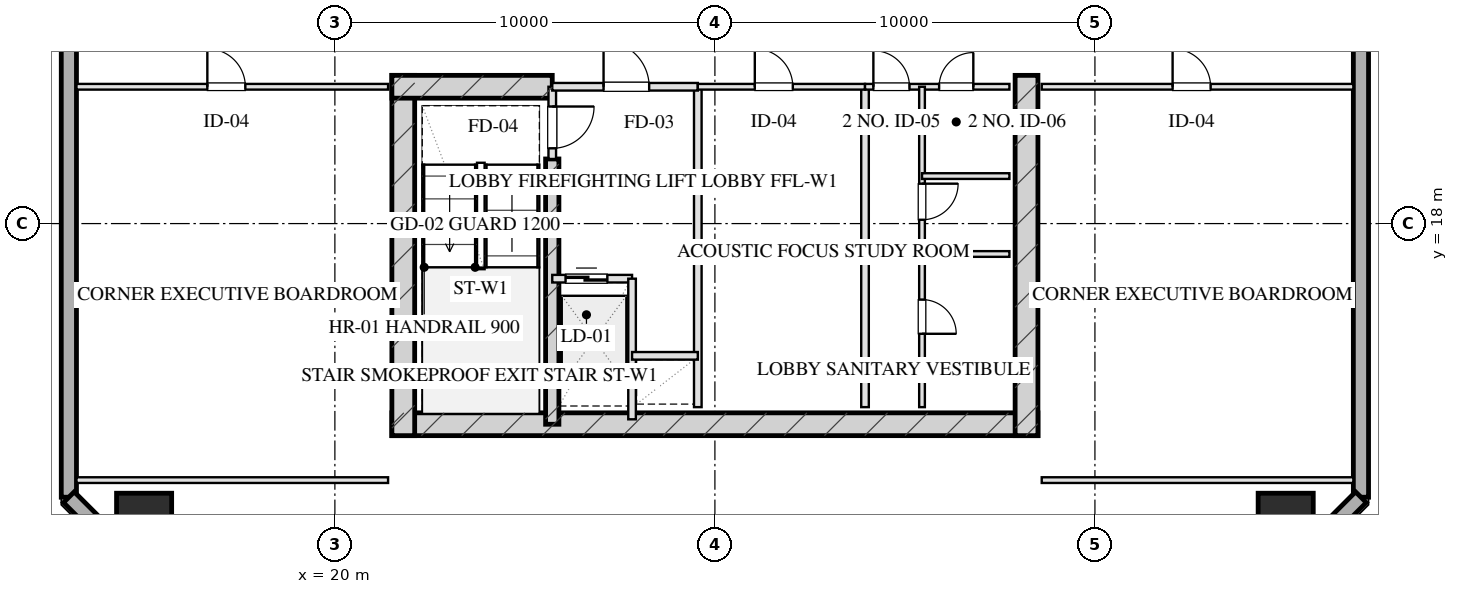
"""IFC4 building model, lengths in metres.
Left out: names, types, materials, properties, quantities, classifications, styles, units other than length and angle.
Written with IfcOpenShell. Run it as: python <this file> out.ifc"""

import sys

from ifc_helpers import new_model, si_unit, direction, frame, frame_2d, origin, origin_2d, place, context, subcontext, project, spatial, rectangle, hollow_rectangle, extrude, element, fill, save


model = new_model("IFC4")
c1 = context("Model", 3, precision=1e-05, world=origin(), true_north=direction((0.0, 1.0)))
c2 = subcontext(c1, "Body", "Model", "MODEL_VIEW")
j1 = project(units=[si_unit("LENGTHUNIT", "METRE"), si_unit("PLANEANGLEUNIT", "RADIAN")], contexts=[c1])
p1 = place(None, origin())
s1 = spatial("IfcSite", under=j1, at=p1, CompositionType="ELEMENT")
p2 = place(p1, origin())
s2 = spatial("IfcBuilding", under=s1, at=p2, CompositionType="ELEMENT")
p3 = place(p2, frame((0.0, 0.0, 170.2)))
s3 = spatial("IfcBuildingStorey", under=s2, at=p3, CompositionType="ELEMENT", Elevation=170.2)
p4 = place(p3, frame((21.5, 12.72, 0.0), z_axis=(0.0, 0.0, 1.0), x_axis=(1.0, 0.0, 0.0)))
e1 = element("IfcWall", 1, at=p4, inside=s3, PredefinedType="SHEAR", context=c2, shape_type="SweptSolid", body=[
    extrude(rectangle(XDim=17.0, YDim=0.6, at=frame_2d((8.5, 0.0))), origin(), (0.0, 0.0, 1.0), 3.45),
])
for number, where, z_axis, x_axis in (
    (2, (21.8, 21.9, 0.0), (0.0, 0.0, 1.0), (0.0, -1.0, 0.0)),
    (3, (38.2, 21.9, 0.0), (0.0, 0.0, 1.0), (0.0, -1.0, 0.0)),
):
    element("IfcWall", number, at=place(p3, frame(where, z_axis=z_axis, x_axis=x_axis)), inside=s3, PredefinedType="SHEAR", context=c2, shape_type="SweptSolid", body=[
        extrude(rectangle(XDim=9.48, YDim=0.6, at=frame_2d((4.74, 0.0))), origin(), (0.0, 0.0, 1.0), 3.45),
    ])
p5 = place(p3, frame((25.72, 19.7, 0.0), z_axis=(0.0, 0.0, 1.0), x_axis=(0.0, -1.0, 0.0)))
e4 = element("IfcWall", 4, at=p5, inside=s3, PredefinedType="SHEAR", context=c2, shape_type="SweptSolid", body=[
    extrude(rectangle(XDim=6.98, YDim=0.35, at=frame_2d((3.49, 0.0))), origin(), (0.0, 0.0, 1.0), 3.45),
])
p6 = place(p3, frame((21.5, 21.6, 0.0), z_axis=(0.0, 0.0, 1.0), x_axis=(1.0, 0.0, 0.0)))
e5 = element("IfcWall", 5, at=p6, inside=s3, PredefinedType="SHEAR", context=c2, shape_type="SweptSolid", body=[
    extrude(rectangle(XDim=4.22, YDim=0.6, at=frame_2d((2.11, 0.0))), origin(), (0.0, 0.0, 1.0), 3.45),
])
for number, where, z_axis, x_axis in (
    (6, (14.98, 10.18, 0.0), (0.0, 0.0, 1.0), (1.0, 0.0, 0.0)),
    (7, (45.02, 10.18, 0.0), (0.0, 0.0, 1.0), (1.0, 0.0, 0.0)),
):
    element("IfcColumn", number, at=place(p3, frame(where, z_axis=z_axis, x_axis=x_axis)), inside=s3, PredefinedType="COLUMN", context=c2, shape_type="SweptSolid", body=[
        extrude(hollow_rectangle(XDim=1.45, YDim=1.45, WallThickness=0.05, at=origin_2d()), origin(), (0.0, 0.0, 1.0), 3.451),
    ])
p7 = place(p3, frame((13.0, 10.8, 0.0), z_axis=(0.0, 0.0, 1.0), x_axis=(0.0, 1.0, 0.0)))
e8 = element("IfcWall", 8, at=p7, inside=s3, PredefinedType="SOLIDWALL", context=c2, shape_type="SweptSolid", body=[
    extrude(rectangle(XDim=46.4, YDim=0.4, at=frame_2d((23.2, 0.0))), origin(), (0.0, 0.0, 1.0), 2.61),
])
p8 = place(p3, frame((47.0, 57.2, 0.0), z_axis=(0.0, 0.0, 1.0), x_axis=(0.0, -1.0, 0.0)))
e9 = element("IfcWall", 9, at=p8, inside=s3, PredefinedType="SOLIDWALL", context=c2, shape_type="SweptSolid", body=[
    extrude(rectangle(XDim=46.4, YDim=0.4, at=frame_2d((23.2, 0.0))), origin(), (0.0, 0.0, 1.0), 2.61),
])
p9 = place(p8, frame((28.475, 0.0, 0.75)))
e10 = element("IfcOpeningElement", 10, at=p9, cuts=e9, PredefinedType="OPENING", context=c2, shape_type="SweptSolid", body=[
    extrude(rectangle(XDim=2.25, YDim=1.46, at=frame_2d((1.125, 0.73))), frame((0.0, 0.21, 0.0), z_axis=(0.0, -1.0, 0.0), x_axis=(1.0, 0.0, 0.0)), (0.0, 0.0, 1.0), 0.42),
])
p10 = place(p8, frame((24.675, 0.0, 0.75)))
e11 = element("IfcOpeningElement", 11, at=p10, cuts=e9, PredefinedType="OPENING", context=c2, shape_type="SweptSolid", body=[
    extrude(rectangle(XDim=2.25, YDim=1.46, at=frame_2d((1.125, 0.73))), frame((0.0, 0.21, 0.0), z_axis=(0.0, -1.0, 0.0), x_axis=(1.0, 0.0, 0.0)), (0.0, 0.0, 1.0), 0.42),
])
for number, where, z_axis, x_axis in (
    (12, (47.0, 10.8, 0.0), (0.0, 0.0, 1.0), (-0.707, -0.707, 0.0)),
    (13, (15.6, 8.2, 0.0), (0.0, 0.0, 1.0), (-0.707, 0.707, 0.0)),
):
    element("IfcWall", number, at=place(p3, frame(where, z_axis=z_axis, x_axis=x_axis)), inside=s3, PredefinedType="SOLIDWALL", context=c2, shape_type="SweptSolid", body=[
        extrude(rectangle(XDim=3.677, YDim=0.4, at=frame_2d((1.838, 0.0))), origin(), (0.0, 0.0, 1.0), 2.61),
    ])
p11 = place(p3, frame((25.72, 21.6, 0.0), z_axis=(0.0, 0.0, 1.0), x_axis=(0.0, -1.0, 0.0)))
e14 = element("IfcWall", 14, at=p11, inside=s3, PredefinedType="PARTITIONING", context=c2, shape_type="SweptSolid", body=[
    extrude(rectangle(XDim=1.9, YDim=0.2, at=frame_2d((0.95, 0.0))), origin(), (0.0, 0.0, 1.0), 3.175),
])
p12 = place(p11, frame((0.52, 0.0, 0.0)))
e15 = element("IfcOpeningElement", 15, at=p12, cuts=e14, PredefinedType="OPENING", context=c2, shape_type="SweptSolid", body=[
    extrude(rectangle(XDim=1.1, YDim=2.05, at=frame_2d((0.55, 1.025))), frame((0.0, 0.11, 0.0), z_axis=(0.0, -1.0, 0.0), x_axis=(1.0, 0.0, 0.0)), (0.0, 0.0, 1.0), 0.22),
])
p13 = place(p3, frame((29.55, 21.6, 0.0), z_axis=(0.0, 0.0, 1.0), x_axis=(0.0, -1.0, 0.0)))
e16 = element("IfcWall", 16, at=p13, inside=s3, PredefinedType="PARTITIONING", context=c2, shape_type="SweptSolid", body=[
    extrude(rectangle(XDim=8.43, YDim=0.2, at=frame_2d((4.215, 0.0))), origin(), (0.0, 0.0, 1.0), 3.175),
])
p14 = place(p3, frame((25.72, 21.6, 0.0), z_axis=(0.0, 0.0, 1.0), x_axis=(1.0, 0.0, 0.0)))
e17 = element("IfcWall", 17, at=p14, inside=s3, PredefinedType="PARTITIONING", context=c2, shape_type="SweptSolid", body=[
    extrude(rectangle(XDim=3.83, YDim=0.2, at=frame_2d((1.915, 0.0))), origin(), (0.0, 0.0, 1.0), 3.175),
])
p15 = place(p14, frame((1.35, 0.0, 0.0)))
e18 = element("IfcOpeningElement", 18, at=p15, cuts=e17, PredefinedType="OPENING", context=c2, shape_type="SweptSolid", body=[
    extrude(rectangle(XDim=1.2, YDim=2.05, at=frame_2d((0.6, 1.025))), frame((0.0, 0.11, 0.0), z_axis=(0.0, -1.0, 0.0), x_axis=(1.0, 0.0, 0.0)), (0.0, 0.0, 1.0), 0.22),
])
p16 = place(p3, frame((25.72, 16.55, 0.0), z_axis=(0.0, 0.0, 1.0), x_axis=(1.0, 0.0, 0.0)))
e19 = element("IfcWall", 19, at=p16, inside=s3, PredefinedType="PARTITIONING", context=c2, shape_type="SweptSolid", body=[
    extrude(rectangle(XDim=2.1, YDim=0.2, at=frame_2d((1.05, 0.0))), origin(), (0.0, 0.0, 1.0), 3.175),
])
p17 = place(p16, frame((0.35, 0.0, 0.0)))
e20 = element("IfcOpeningElement", 20, at=p17, cuts=e19, PredefinedType="OPENING", context=c2, shape_type="SweptSolid", body=[
    extrude(rectangle(XDim=1.1, YDim=2.05, at=frame_2d((0.55, 1.025))), frame((0.0, 0.11, 0.0), z_axis=(0.0, -1.0, 0.0), x_axis=(1.0, 0.0, 0.0)), (0.0, 0.0, 1.0), 0.22),
])
p18 = place(p3, frame((27.82, 16.55, 0.0), z_axis=(0.0, 0.0, 1.0), x_axis=(0.0, -1.0, 0.0)))
e21 = element("IfcWall", 21, at=p18, inside=s3, PredefinedType="PARTITIONING", context=c2, shape_type="SweptSolid", body=[
    extrude(rectangle(XDim=3.7, YDim=0.2, at=frame_2d((1.85, 0.0))), origin(), (0.0, 0.0, 1.0), 3.175),
])
p19 = place(p3, frame((27.82, 14.52, 0.0), z_axis=(0.0, 0.0, 1.0), x_axis=(1.0, 0.0, 0.0)))
e22 = element("IfcWall", 22, at=p19, inside=s3, PredefinedType="PARTITIONING", context=c2, shape_type="SweptSolid", body=[
    extrude(rectangle(XDim=1.73, YDim=0.2, at=frame_2d((0.865, 0.0))), origin(), (0.0, 0.0, 1.0), 3.175),
])
p20 = place(p3, frame((33.95, 21.6, 0.0), z_axis=(0.0, 0.0, 1.0), x_axis=(0.0, -1.0, 0.0)))
e23 = element("IfcWall", 23, at=p20, inside=s3, PredefinedType="PARTITIONING", context=c2, shape_type="SweptSolid", body=[
    extrude(rectangle(XDim=8.43, YDim=0.2, at=frame_2d((4.215, 0.0))), origin(), (0.0, 0.0, 1.0), 3.175),
])
p21 = place(p3, frame((29.55, 21.6, 0.0), z_axis=(0.0, 0.0, 1.0), x_axis=(1.0, 0.0, 0.0)))
e24 = element("IfcWall", 24, at=p21, inside=s3, PredefinedType="PARTITIONING", context=c2, shape_type="SweptSolid", body=[
    extrude(rectangle(XDim=4.4, YDim=0.15, at=frame_2d((2.2, 0.0))), origin(), (0.0, 0.0, 1.0), 3.175),
])
p22 = place(p21, frame((1.5, 0.0, 0.0)))
e25 = element("IfcOpeningElement", 25, at=p22, cuts=e24, PredefinedType="OPENING", context=c2, shape_type="SweptSolid", body=[
    extrude(rectangle(XDim=1.0, YDim=2.05, at=frame_2d((0.5, 1.025))), frame((0.0, 0.085, 0.0), z_axis=(0.0, -1.0, 0.0), x_axis=(1.0, 0.0, 0.0)), (0.0, 0.0, 1.0), 0.17),
])
p23 = place(p3, frame((29.55, 17.3, 0.0), z_axis=(0.0, 0.0, 1.0), x_axis=(1.0, 0.0, 0.0)))
e26 = element("IfcWall", 26, at=p23, inside=s3, PredefinedType="PARTITIONING", context=c2, shape_type="SweptSolid", body=[
    extrude(rectangle(XDim=4.4, YDim=0.15, at=frame_2d((2.2, 0.0))), origin(), (0.0, 0.0, 1.0), 3.175),
])
p24 = place(p3, frame((33.95, 21.6, 0.0), z_axis=(0.0, 0.0, 1.0), x_axis=(1.0, 0.0, 0.0)))
e27 = element("IfcWall", 27, at=p24, inside=s3, PredefinedType="PARTITIONING", context=c2, shape_type="SweptSolid", body=[
    extrude(rectangle(XDim=3.8, YDim=0.15, at=frame_2d((1.9, 0.0))), origin(), (0.0, 0.0, 1.0), 3.175),
])
p25 = place(p24, frame((0.22, 0.0, 0.0)))
e28 = element("IfcOpeningElement", 28, at=p25, cuts=e27, PredefinedType="OPENING", context=c2, shape_type="SweptSolid", body=[
    extrude(rectangle(XDim=0.95, YDim=2.05, at=frame_2d((0.475, 1.025))), frame((0.0, 0.085, 0.0), z_axis=(0.0, -1.0, 0.0), x_axis=(1.0, 0.0, 0.0)), (0.0, 0.0, 1.0), 0.17),
])
p26 = place(p24, frame((1.95, 0.0, 0.0)))
e29 = element("IfcOpeningElement", 29, at=p26, cuts=e27, PredefinedType="OPENING", context=c2, shape_type="SweptSolid", body=[
    extrude(rectangle(XDim=0.9, YDim=2.05, at=frame_2d((0.45, 1.025))), frame((0.0, 0.085, 0.0), z_axis=(0.0, -1.0, 0.0), x_axis=(1.0, 0.0, 0.0)), (0.0, 0.0, 1.0), 0.17),
])
p27 = place(p3, frame((35.45, 21.6, 0.0), z_axis=(0.0, 0.0, 1.0), x_axis=(0.0, -1.0, 0.0)))
e30 = element("IfcWall", 30, at=p27, inside=s3, PredefinedType="PARTITIONING", context=c2, shape_type="SweptSolid", body=[
    extrude(rectangle(XDim=8.43, YDim=0.15, at=frame_2d((4.215, 0.0))), origin(), (0.0, 0.0, 1.0), 2.815),
])
p28 = place(p27, frame((2.55, 0.0, 0.0)))
e31 = element("IfcOpeningElement", 31, at=p28, cuts=e30, PredefinedType="OPENING", context=c2, shape_type="SweptSolid", body=[
    extrude(rectangle(XDim=0.95, YDim=2.05, at=frame_2d((0.475, 1.025))), frame((0.0, 0.085, 0.0), z_axis=(0.0, -1.0, 0.0), x_axis=(1.0, 0.0, 0.0)), (0.0, 0.0, 1.0), 0.17),
])
p29 = place(p27, frame((5.6, 0.0, 0.0)))
e32 = element("IfcOpeningElement", 32, at=p29, cuts=e30, PredefinedType="OPENING", context=c2, shape_type="SweptSolid", body=[
    extrude(rectangle(XDim=0.9, YDim=2.05, at=frame_2d((0.45, 1.025))), frame((0.0, 0.085, 0.0), z_axis=(0.0, -1.0, 0.0), x_axis=(1.0, 0.0, 0.0)), (0.0, 0.0, 1.0), 0.17),
])
for number, where, z_axis, x_axis in (
    (33, (35.45, 17.2, 0.0), (0.0, 0.0, 1.0), (1.0, 0.0, 0.0)),
    (34, (35.45, 19.25, 0.0), (0.0, 0.0, 1.0), (1.0, 0.0, 0.0)),
):
    element("IfcWall", number, at=place(p3, frame(where, z_axis=z_axis, x_axis=x_axis)), inside=s3, PredefinedType="PARTITIONING", context=c2, shape_type="SweptSolid", body=[
        extrude(rectangle(XDim=2.3, YDim=0.15, at=frame_2d((1.15, 0.0))), origin(), (0.0, 0.0, 1.0), 3.175),
    ])
p30 = place(p3, frame((13.2, 11.25, 0.0), z_axis=(0.0, 0.0, 1.0), x_axis=(1.0, 0.0, 0.0)))
e35 = element("IfcWall", 35, at=p30, inside=s3, PredefinedType="PARTITIONING", context=c2, shape_type="SweptSolid", body=[
    extrude(rectangle(XDim=8.2, YDim=0.15, at=frame_2d((4.1, 0.0))), origin(), (0.0, 0.0, 1.0), 3.175),
])
p31 = place(p3, frame((13.2, 21.6, 0.0), z_axis=(0.0, 0.0, 1.0), x_axis=(1.0, 0.0, 0.0)))
e36 = element("IfcWall", 36, at=p31, inside=s3, PredefinedType="PARTITIONING", context=c2, shape_type="SweptSolid", body=[
    extrude(rectangle(XDim=8.2, YDim=0.15, at=frame_2d((4.1, 0.0))), origin(), (0.0, 0.0, 1.0), 3.175),
])
p32 = place(p31, frame((3.444, 0.0, 0.0)))
e37 = element("IfcOpeningElement", 37, at=p32, cuts=e36, PredefinedType="OPENING", context=c2, shape_type="SweptSolid", body=[
    extrude(rectangle(XDim=1.0, YDim=2.05, at=frame_2d((0.5, 1.025))), frame((0.0, 0.085, 0.0), z_axis=(0.0, -1.0, 0.0), x_axis=(1.0, 0.0, 0.0)), (0.0, 0.0, 1.0), 0.17),
])
p33 = place(p3, frame((38.6, 11.25, 0.0), z_axis=(0.0, 0.0, 1.0), x_axis=(1.0, 0.0, 0.0)))
e38 = element("IfcWall", 38, at=p33, inside=s3, PredefinedType="PARTITIONING", context=c2, shape_type="SweptSolid", body=[
    extrude(rectangle(XDim=8.2, YDim=0.15, at=frame_2d((4.1, 0.0))), origin(), (0.0, 0.0, 1.0), 3.175),
])
p34 = place(p3, frame((38.6, 21.6, 0.0), z_axis=(0.0, 0.0, 1.0), x_axis=(1.0, 0.0, 0.0)))
e39 = element("IfcWall", 39, at=p34, inside=s3, PredefinedType="PARTITIONING", context=c2, shape_type="SweptSolid", body=[
    extrude(rectangle(XDim=8.2, YDim=0.15, at=frame_2d((4.1, 0.0))), origin(), (0.0, 0.0, 1.0), 3.175),
])
p35 = place(p34, frame((3.444, 0.0, 0.0)))
e40 = element("IfcOpeningElement", 40, at=p35, cuts=e39, PredefinedType="OPENING", context=c2, shape_type="SweptSolid", body=[
    extrude(rectangle(XDim=1.0, YDim=2.05, at=frame_2d((0.5, 1.025))), frame((0.0, 0.085, 0.0), z_axis=(0.0, -1.0, 0.0), x_axis=(1.0, 0.0, 0.0)), (0.0, 0.0, 1.0), 0.17),
])
p36 = place(p12, origin())
e41 = element("IfcDoor", 41, at=p36, inside=s3, OperationType="SINGLE_SWING_LEFT", PredefinedType="DOOR", context=c2, shape_type="SweptSolid", body=[
    extrude(rectangle(XDim=1.1, YDim=2.05, at=frame_2d((0.55, 1.025))), frame((0.0, 0.025, 0.0), z_axis=(0.0, -1.0, 0.0), x_axis=(1.0, 0.0, 0.0)), (0.0, 0.0, 1.0), 0.05),
])
fill(e15, e41)
p37 = place(p15, origin())
e42 = element("IfcDoor", 42, at=p37, inside=s3, OperationType="SINGLE_SWING_LEFT", PredefinedType="DOOR", context=c2, shape_type="SweptSolid", body=[
    extrude(rectangle(XDim=1.2, YDim=2.05, at=frame_2d((0.6, 1.025))), frame((0.0, 0.025, 0.0), z_axis=(0.0, -1.0, 0.0), x_axis=(1.0, 0.0, 0.0)), (0.0, 0.0, 1.0), 0.05),
])
fill(e18, e42)
p38 = place(p17, origin())
e43 = element("IfcDoor", 43, at=p38, inside=s3, OperationType="DOUBLE_DOOR_SLIDING", PredefinedType="DOOR", context=c2, shape_type="SweptSolid", body=[
    extrude(rectangle(XDim=1.1, YDim=2.05, at=frame_2d((0.55, 1.025))), frame((0.0, 0.025, 0.0), z_axis=(0.0, -1.0, 0.0), x_axis=(1.0, 0.0, 0.0)), (0.0, 0.0, 1.0), 0.05),
])
fill(e20, e43)
p39 = place(p22, origin())
e44 = element("IfcDoor", 44, at=p39, inside=s3, OperationType="SINGLE_SWING_LEFT", PredefinedType="DOOR", context=c2, shape_type="SweptSolid", body=[
    extrude(rectangle(XDim=1.0, YDim=2.05, at=frame_2d((0.5, 1.025))), frame((0.0, 0.025, 0.0), z_axis=(0.0, -1.0, 0.0), x_axis=(1.0, 0.0, 0.0)), (0.0, 0.0, 1.0), 0.05),
])
fill(e25, e44)
p40 = place(p25, origin())
e45 = element("IfcDoor", 45, at=p40, inside=s3, OperationType="SINGLE_SWING_LEFT", PredefinedType="DOOR", context=c2, shape_type="SweptSolid", body=[
    extrude(rectangle(XDim=0.95, YDim=2.05, at=frame_2d((0.475, 1.025))), frame((0.0, 0.025, 0.0), z_axis=(0.0, -1.0, 0.0), x_axis=(1.0, 0.0, 0.0)), (0.0, 0.0, 1.0), 0.05),
])
fill(e28, e45)
p41 = place(p26, origin())
e46 = element("IfcDoor", 46, at=p41, inside=s3, OperationType="SINGLE_SWING_RIGHT", PredefinedType="DOOR", context=c2, shape_type="SweptSolid", body=[
    extrude(rectangle(XDim=0.9, YDim=2.05, at=frame_2d((0.45, 1.025))), frame((0.0, 0.025, 0.0), z_axis=(0.0, -1.0, 0.0), x_axis=(1.0, 0.0, 0.0)), (0.0, 0.0, 1.0), 0.05),
])
fill(e29, e46)
p42 = place(p28, origin())
e47 = element("IfcDoor", 47, at=p42, inside=s3, OperationType="SINGLE_SWING_LEFT", PredefinedType="DOOR", context=c2, shape_type="SweptSolid", body=[
    extrude(rectangle(XDim=0.95, YDim=2.05, at=frame_2d((0.475, 1.025))), frame((0.0, 0.025, 0.0), z_axis=(0.0, -1.0, 0.0), x_axis=(1.0, 0.0, 0.0)), (0.0, 0.0, 1.0), 0.05),
])
fill(e31, e47)
p43 = place(p29, origin())
e48 = element("IfcDoor", 48, at=p43, inside=s3, OperationType="SINGLE_SWING_RIGHT", PredefinedType="DOOR", context=c2, shape_type="SweptSolid", body=[
    extrude(rectangle(XDim=0.9, YDim=2.05, at=frame_2d((0.45, 1.025))), frame((0.0, 0.025, 0.0), z_axis=(0.0, -1.0, 0.0), x_axis=(1.0, 0.0, 0.0)), (0.0, 0.0, 1.0), 0.05),
])
fill(e32, e48)
p44 = place(p32, origin())
e49 = element("IfcDoor", 49, at=p44, inside=s3, OperationType="SINGLE_SWING_LEFT", PredefinedType="DOOR", context=c2, shape_type="SweptSolid", body=[
    extrude(rectangle(XDim=1.0, YDim=2.05, at=frame_2d((0.5, 1.025))), frame((0.0, 0.025, 0.0), z_axis=(0.0, -1.0, 0.0), x_axis=(1.0, 0.0, 0.0)), (0.0, 0.0, 1.0), 0.05),
])
fill(e37, e49)
p45 = place(p35, origin())
e50 = element("IfcDoor", 50, at=p45, inside=s3, OperationType="SINGLE_SWING_LEFT", PredefinedType="DOOR", context=c2, shape_type="SweptSolid", body=[
    extrude(rectangle(XDim=1.0, YDim=2.05, at=frame_2d((0.5, 1.025))), frame((0.0, 0.025, 0.0), z_axis=(0.0, -1.0, 0.0), x_axis=(1.0, 0.0, 0.0)), (0.0, 0.0, 1.0), 0.05),
])
fill(e40, e50)
save(model, sys.argv[1])
